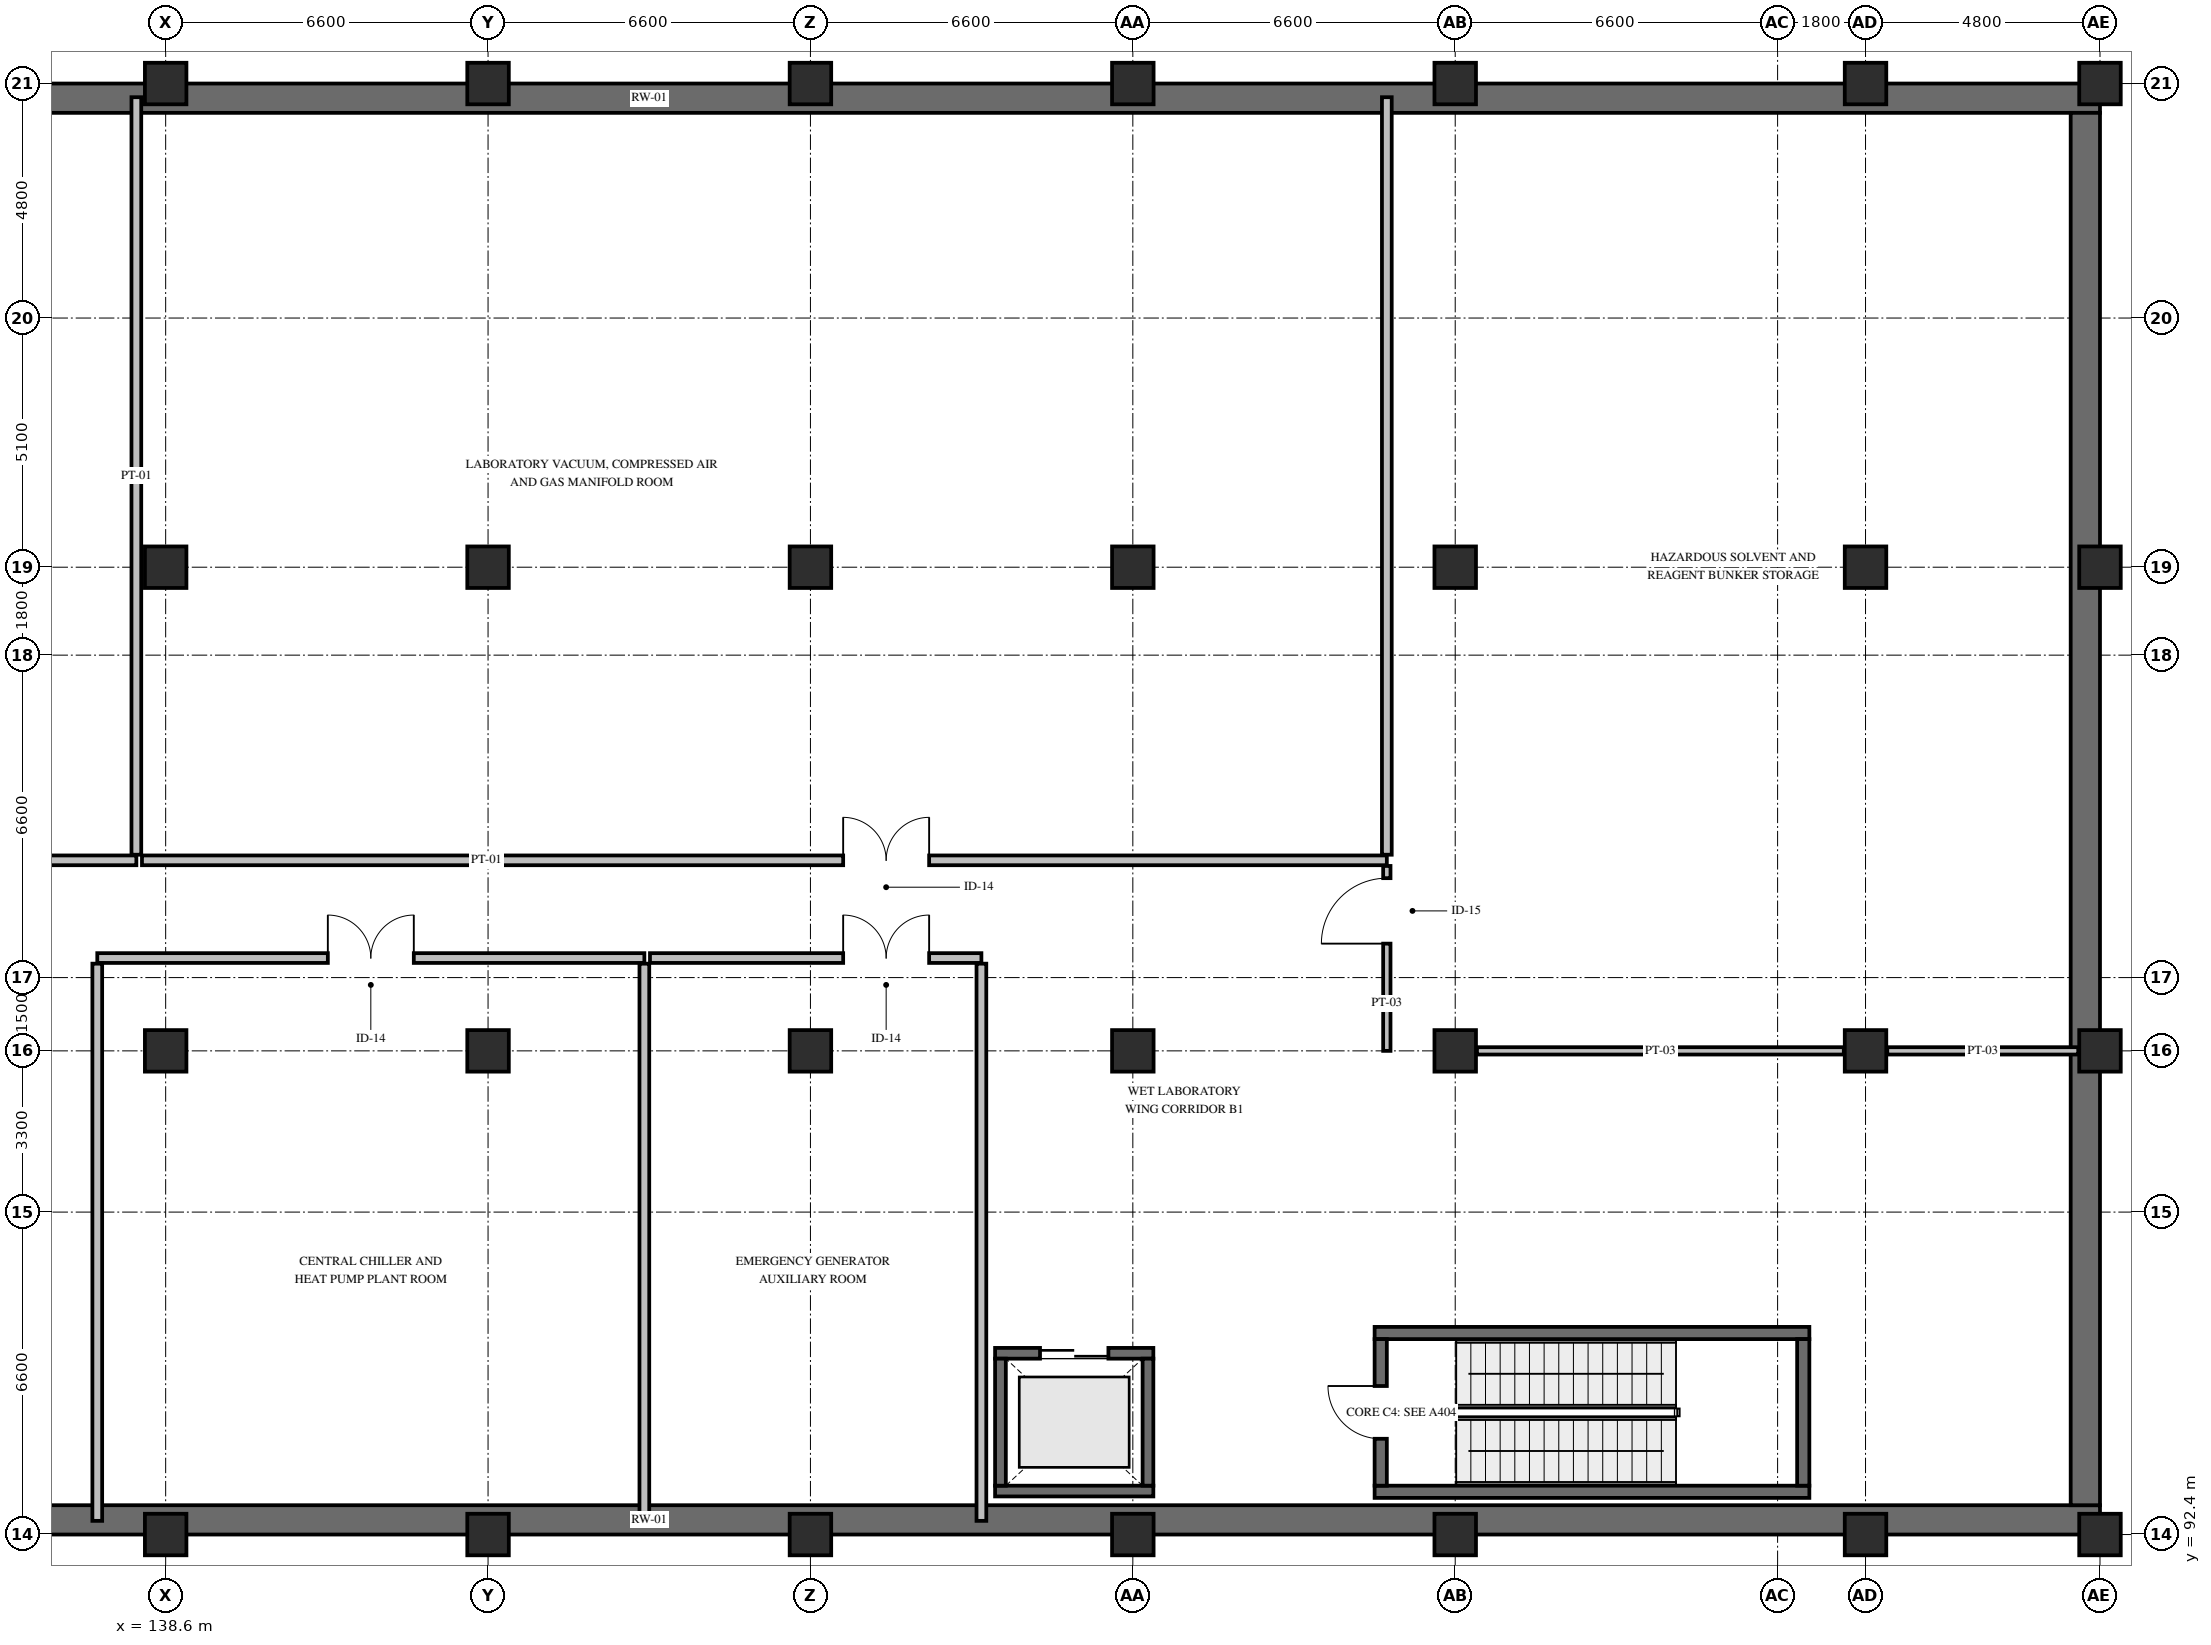
"""IFC4 building model, lengths in metres.
Left out: names, types, materials, properties, quantities, classifications, styles, units other than length and angle.
Written with IfcOpenShell. Run it as: python <this file> out.ifc"""

import sys

from ifc_helpers import new_model, si_unit, direction, frame, frame_2d, origin, origin_2d, place, context, subcontext, project, spatial, rectangle, extrude, element, fill, save


model = new_model("IFC4")
c1 = context("Model", 3, precision=1e-05, world=origin(), true_north=direction((0.0, 1.0)))
c2 = subcontext(c1, "Body", "Model", "MODEL_VIEW")
j1 = project(units=[si_unit("LENGTHUNIT", "METRE"), si_unit("PLANEANGLEUNIT", "RADIAN")], contexts=[c1])
p1 = place(None, origin())
s1 = spatial("IfcSite", under=j1, at=p1, CompositionType="ELEMENT")
p2 = place(p1, origin())
s2 = spatial("IfcBuilding", under=s1, at=p2, CompositionType="ELEMENT")
p3 = place(p2, frame((0.0, 0.0, -5.4)))
s3 = spatial("IfcBuildingStorey", under=s2, at=p3, CompositionType="ELEMENT", Elevation=-5.4)
for number, where, z_axis, x_axis in (
    (1, (118.8, 92.7, 0.0), (0.0, 0.0, 1.0), (1.0, 0.0, 0.0)),
    (2, (118.8, 121.8, 0.0), (0.0, 0.0, 1.0), (1.0, 0.0, 0.0)),
):
    element("IfcWall", number, at=place(p3, frame(where, z_axis=z_axis, x_axis=x_axis)), inside=s3, PredefinedType="USERDEFINED", context=c2, shape_type="SweptSolid", body=[
        extrude(rectangle(XDim=59.4, YDim=0.6, at=frame_2d((29.7, 0.0))), origin(), (0.0, 0.0, 1.0), 4.96),
    ])
p4 = place(p3, frame((177.9, 93.0, 0.0), z_axis=(0.0, 0.0, 1.0), x_axis=(0.0, 1.0, 0.0)))
e3 = element("IfcWall", 3, at=p4, inside=s3, PredefinedType="USERDEFINED", context=c2, shape_type="SweptSolid", body=[
    extrude(rectangle(XDim=28.5, YDim=0.6, at=frame_2d((14.25, 0.0))), origin(), (0.0, 0.0, 1.0), 4.96),
])
for number, where, z_axis, x_axis in (
    (4, (138.6, 92.4, 0.0), (0.0, 0.0, 1.0), (1.0, 0.0, 0.0)),
    (5, (138.6, 102.3, 0.0), (0.0, 0.0, 1.0), (1.0, 0.0, 0.0)),
    (6, (138.6, 112.2, 0.0), (0.0, 0.0, 1.0), (1.0, 0.0, 0.0)),
    (7, (138.6, 122.1, 0.0), (0.0, 0.0, 1.0), (1.0, 0.0, 0.0)),
    (8, (145.2, 92.4, 0.0), (0.0, 0.0, 1.0), (1.0, 0.0, 0.0)),
    (9, (145.2, 102.3, 0.0), (0.0, 0.0, 1.0), (1.0, 0.0, 0.0)),
    (10, (145.2, 112.2, 0.0), (0.0, 0.0, 1.0), (1.0, 0.0, 0.0)),
    (11, (145.2, 122.1, 0.0), (0.0, 0.0, 1.0), (1.0, 0.0, 0.0)),
    (12, (151.8, 92.4, 0.0), (0.0, 0.0, 1.0), (1.0, 0.0, 0.0)),
    (13, (151.8, 102.3, 0.0), (0.0, 0.0, 1.0), (1.0, 0.0, 0.0)),
    (14, (151.8, 112.2, 0.0), (0.0, 0.0, 1.0), (1.0, 0.0, 0.0)),
    (15, (151.8, 122.1, 0.0), (0.0, 0.0, 1.0), (1.0, 0.0, 0.0)),
    (16, (158.4, 92.4, 0.0), (0.0, 0.0, 1.0), (1.0, 0.0, 0.0)),
    (17, (158.4, 102.3, 0.0), (0.0, 0.0, 1.0), (1.0, 0.0, 0.0)),
    (18, (158.4, 112.2, 0.0), (0.0, 0.0, 1.0), (1.0, 0.0, 0.0)),
    (19, (158.4, 122.1, 0.0), (0.0, 0.0, 1.0), (1.0, 0.0, 0.0)),
    (20, (165.0, 92.4, 0.0), (0.0, 0.0, 1.0), (1.0, 0.0, 0.0)),
    (21, (165.0, 102.3, 0.0), (0.0, 0.0, 1.0), (1.0, 0.0, 0.0)),
    (22, (165.0, 112.2, 0.0), (0.0, 0.0, 1.0), (1.0, 0.0, 0.0)),
    (23, (165.0, 122.1, 0.0), (0.0, 0.0, 1.0), (1.0, 0.0, 0.0)),
    (24, (173.4, 92.4, 0.0), (0.0, 0.0, 1.0), (1.0, 0.0, 0.0)),
    (25, (173.4, 102.3, 0.0), (0.0, 0.0, 1.0), (1.0, 0.0, 0.0)),
    (26, (173.4, 112.2, 0.0), (0.0, 0.0, 1.0), (1.0, 0.0, 0.0)),
    (27, (173.4, 122.1, 0.0), (0.0, 0.0, 1.0), (1.0, 0.0, 0.0)),
    (28, (178.2, 92.4, 0.0), (0.0, 0.0, 1.0), (1.0, 0.0, 0.0)),
    (29, (178.2, 102.3, 0.0), (0.0, 0.0, 1.0), (1.0, 0.0, 0.0)),
    (30, (178.2, 112.2, 0.0), (0.0, 0.0, 1.0), (1.0, 0.0, 0.0)),
    (31, (178.2, 122.1, 0.0), (0.0, 0.0, 1.0), (1.0, 0.0, 0.0)),
):
    element("IfcColumn", number, at=place(p3, frame(where, z_axis=z_axis, x_axis=x_axis)), inside=s3, PredefinedType="COLUMN", context=c2, shape_type="SweptSolid", body=[
        extrude(rectangle(XDim=0.85, YDim=0.85, at=origin_2d()), origin(), (0.0, 0.0, 1.0), 5.4),
    ])
for number, where, z_axis, x_axis in (
    (32, (163.35, 93.275, 0.0), (0.0, 0.0, 1.0), (1.0, 0.0, 0.0)),
    (33, (163.35, 96.525, 0.0), (0.0, 0.0, 1.0), (1.0, 0.0, 0.0)),
):
    element("IfcWall", number, at=place(p3, frame(where, z_axis=z_axis, x_axis=x_axis)), inside=s3, PredefinedType="SHEAR", context=c2, shape_type="SweptSolid", body=[
        extrude(rectangle(XDim=8.9, YDim=0.25, at=frame_2d((4.45, 0.0))), origin(), (0.0, 0.0, 1.0), 4.96),
    ])
p5 = place(p3, frame((163.475, 93.4, 0.0), z_axis=(0.0, 0.0, 1.0), x_axis=(0.0, 1.0, 0.0)))
e34 = element("IfcWall", 34, at=p5, inside=s3, PredefinedType="SHEAR", context=c2, shape_type="SweptSolid", body=[
    extrude(rectangle(XDim=3.0, YDim=0.25, at=frame_2d((1.5, 0.0))), origin(), (0.0, 0.0, 1.0), 4.96),
])
p6 = place(p5, frame((0.96, 0.0, 0.0)))
e35 = element("IfcOpeningElement", 35, at=p6, cuts=e34, PredefinedType="OPENING", context=c2, shape_type="SweptSolid", body=[
    extrude(rectangle(XDim=1.08, YDim=2.2, at=frame_2d((0.54, 1.1))), frame((0.0, 0.14, 0.0), z_axis=(0.0, -1.0, 0.0), x_axis=(1.0, 0.0, 0.0)), (0.0, 0.0, 1.0), 0.28),
])
p7 = place(p3, frame((172.125, 93.4, 0.0), z_axis=(0.0, 0.0, 1.0), x_axis=(0.0, 1.0, 0.0)))
e36 = element("IfcWall", 36, at=p7, inside=s3, PredefinedType="SHEAR", context=c2, shape_type="SweptSolid", body=[
    extrude(rectangle(XDim=3.0, YDim=0.25, at=frame_2d((1.5, 0.0))), origin(), (0.0, 0.0, 1.0), 4.96),
])
p8 = place(p3, frame((155.58, 93.29, 0.0), z_axis=(0.0, 0.0, 1.0), x_axis=(1.0, 0.0, 0.0)))
e37 = element("IfcWall", 37, at=p8, inside=s3, PredefinedType="SHEAR", context=c2, shape_type="SweptSolid", body=[
    extrude(rectangle(XDim=3.24, YDim=0.22, at=frame_2d((1.62, 0.0))), origin(), (0.0, 0.0, 1.0), 4.96),
])
p9 = place(p3, frame((155.58, 96.11, 0.0), z_axis=(0.0, 0.0, 1.0), x_axis=(1.0, 0.0, 0.0)))
e38 = element("IfcWall", 38, at=p9, inside=s3, PredefinedType="SHEAR", context=c2, shape_type="SweptSolid", body=[
    extrude(rectangle(XDim=3.24, YDim=0.22, at=frame_2d((1.62, 0.0))), origin(), (0.0, 0.0, 1.0), 4.96),
])
p10 = place(p9, frame((0.92, 0.0, 0.0)))
e39 = element("IfcOpeningElement", 39, at=p10, cuts=e38, PredefinedType="OPENING", context=c2, shape_type="SweptSolid", body=[
    extrude(rectangle(XDim=1.4, YDim=2.3, at=frame_2d((0.7, 1.15))), frame((0.0, 0.125, 0.0), z_axis=(0.0, -1.0, 0.0), x_axis=(1.0, 0.0, 0.0)), (0.0, 0.0, 1.0), 0.25),
])
for number, where, z_axis, x_axis in (
    (40, (155.69, 93.4, 0.0), (0.0, 0.0, 1.0), (0.0, 1.0, 0.0)),
    (41, (158.71, 93.4, 0.0), (0.0, 0.0, 1.0), (0.0, 1.0, 0.0)),
):
    element("IfcWall", number, at=place(p3, frame(where, z_axis=z_axis, x_axis=x_axis)), inside=s3, PredefinedType="SHEAR", context=c2, shape_type="SweptSolid", body=[
        extrude(rectangle(XDim=2.6, YDim=0.22, at=frame_2d((1.3, 0.0))), origin(), (0.0, 0.0, 1.0), 4.96),
    ])
p11 = place(p3, frame((119.08, 106.2, 0.0), z_axis=(0.0, 0.0, 1.0), x_axis=(1.0, 0.0, 0.0)))
e42 = element("IfcWall", 42, at=p11, inside=s3, PredefinedType="PARTITIONING", context=c2, shape_type="SweptSolid", body=[
    extrude(rectangle(XDim=18.92, YDim=0.2, at=frame_2d((9.46, 0.0))), origin(), (0.0, 0.0, 1.0), 4.38),
])
p12 = place(p11, frame((8.58, 0.0, 0.0)))
e43 = element("IfcOpeningElement", 43, at=p12, cuts=e42, PredefinedType="OPENING", context=c2, shape_type="SweptSolid", body=[
    extrude(rectangle(XDim=1.76, YDim=2.35, at=frame_2d((0.88, 1.175))), frame((0.0, 0.115, 0.0), z_axis=(0.0, -1.0, 0.0), x_axis=(1.0, 0.0, 0.0)), (0.0, 0.0, 1.0), 0.23),
])
p13 = place(p3, frame((138.0, 106.315, 0.0), z_axis=(0.0, 0.0, 1.0), x_axis=(0.0, 1.0, 0.0)))
e44 = element("IfcWall", 44, at=p13, inside=s3, PredefinedType="PARTITIONING", context=c2, shape_type="SweptSolid", body=[
    extrude(rectangle(XDim=15.505, YDim=0.2, at=frame_2d((7.752, 0.0))), origin(), (0.0, 0.0, 1.0), 4.665),
])
p14 = place(p3, frame((138.115, 106.2, 0.0), z_axis=(0.0, 0.0, 1.0), x_axis=(1.0, 0.0, 0.0)))
e45 = element("IfcWall", 45, at=p14, inside=s3, PredefinedType="PARTITIONING", context=c2, shape_type="SweptSolid", body=[
    extrude(rectangle(XDim=25.485, YDim=0.2, at=frame_2d((12.743, 0.0))), origin(), (0.0, 0.0, 1.0), 4.38),
])
p15 = place(p14, frame((14.355, 0.0, 0.0)))
e46 = element("IfcOpeningElement", 46, at=p15, cuts=e45, PredefinedType="OPENING", context=c2, shape_type="SweptSolid", body=[
    extrude(rectangle(XDim=1.76, YDim=2.35, at=frame_2d((0.88, 1.175))), frame((0.0, 0.115, 0.0), z_axis=(0.0, -1.0, 0.0), x_axis=(1.0, 0.0, 0.0)), (0.0, 0.0, 1.0), 0.23),
])
p16 = place(p3, frame((163.6, 106.315, 0.0), z_axis=(0.0, 0.0, 1.0), x_axis=(0.0, 1.0, 0.0)))
e47 = element("IfcWall", 47, at=p16, inside=s3, PredefinedType="PARTITIONING", context=c2, shape_type="SweptSolid", body=[
    extrude(rectangle(XDim=15.505, YDim=0.2, at=frame_2d((7.752, 0.0))), origin(), (0.0, 0.0, 1.0), 4.665),
])
p17 = place(p3, frame((165.445, 102.3, 0.0), z_axis=(0.0, 0.0, 1.0), x_axis=(1.0, 0.0, 0.0)))
e48 = element("IfcWall", 48, at=p17, inside=s3, PredefinedType="PARTITIONING", context=c2, shape_type="SweptSolid", body=[
    extrude(rectangle(XDim=7.51, YDim=0.15, at=frame_2d((3.755, 0.0))), origin(), (0.0, 0.0, 1.0), 4.43),
])
p18 = place(p3, frame((173.845, 102.3, 0.0), z_axis=(0.0, 0.0, 1.0), x_axis=(1.0, 0.0, 0.0)))
e49 = element("IfcWall", 49, at=p18, inside=s3, PredefinedType="PARTITIONING", context=c2, shape_type="SweptSolid", body=[
    extrude(rectangle(XDim=3.91, YDim=0.15, at=frame_2d((1.955, 0.0))), origin(), (0.0, 0.0, 1.0), 4.665),
])
p19 = place(p3, frame((163.6, 102.3, 0.0), z_axis=(0.0, 0.0, 1.0), x_axis=(0.0, 1.0, 0.0)))
e50 = element("IfcWall", 50, at=p19, inside=s3, PredefinedType="PARTITIONING", context=c2, shape_type="SweptSolid", body=[
    extrude(rectangle(XDim=3.785, YDim=0.15, at=frame_2d((1.893, 0.0))), origin(), (0.0, 0.0, 1.0), 4.665),
])
p20 = place(p19, frame((2.195, 0.0, 0.0)))
e51 = element("IfcOpeningElement", 51, at=p20, cuts=e50, PredefinedType="OPENING", context=c2, shape_type="SweptSolid", body=[
    extrude(rectangle(XDim=1.34, YDim=2.2, at=frame_2d((0.67, 1.1))), frame((0.0, 0.09, 0.0), z_axis=(0.0, -1.0, 0.0), x_axis=(1.0, 0.0, 0.0)), (0.0, 0.0, 1.0), 0.18),
])
p21 = place(p3, frame((137.2, 104.2, 0.0), z_axis=(0.0, 0.0, 1.0), x_axis=(1.0, 0.0, 0.0)))
e52 = element("IfcWall", 52, at=p21, inside=s3, PredefinedType="PARTITIONING", context=c2, shape_type="SweptSolid", body=[
    extrude(rectangle(XDim=11.2, YDim=0.2, at=frame_2d((5.6, 0.0))), origin(), (0.0, 0.0, 1.0), 4.38),
])
p22 = place(p21, frame((4.72, 0.0, 0.0)))
e53 = element("IfcOpeningElement", 53, at=p22, cuts=e52, PredefinedType="OPENING", context=c2, shape_type="SweptSolid", body=[
    extrude(rectangle(XDim=1.76, YDim=2.35, at=frame_2d((0.88, 1.175))), frame((0.0, 0.115, 0.0), z_axis=(0.0, -1.0, 0.0), x_axis=(1.0, 0.0, 0.0)), (0.0, 0.0, 1.0), 0.23),
])
for number, where, z_axis, x_axis in (
    (54, (137.2, 92.68, 0.0), (0.0, 0.0, 1.0), (0.0, 1.0, 0.0)),
    (55, (148.4, 92.68, 0.0), (0.0, 0.0, 1.0), (0.0, 1.0, 0.0)),
):
    element("IfcWall", number, at=place(p3, frame(where, z_axis=z_axis, x_axis=x_axis)), inside=s3, PredefinedType="PARTITIONING", context=c2, shape_type="SweptSolid", body=[
        extrude(rectangle(XDim=11.405, YDim=0.2, at=frame_2d((5.703, 0.0))), origin(), (0.0, 0.0, 1.0), 4.665),
    ])
p23 = place(p3, frame((148.515, 104.2, 0.0), z_axis=(0.0, 0.0, 1.0), x_axis=(1.0, 0.0, 0.0)))
e56 = element("IfcWall", 56, at=p23, inside=s3, PredefinedType="PARTITIONING", context=c2, shape_type="SweptSolid", body=[
    extrude(rectangle(XDim=6.785, YDim=0.2, at=frame_2d((3.393, 0.0))), origin(), (0.0, 0.0, 1.0), 4.38),
])
p24 = place(p23, frame((3.955, 0.0, 0.0)))
e57 = element("IfcOpeningElement", 57, at=p24, cuts=e56, PredefinedType="OPENING", context=c2, shape_type="SweptSolid", body=[
    extrude(rectangle(XDim=1.76, YDim=2.35, at=frame_2d((0.88, 1.175))), frame((0.0, 0.115, 0.0), z_axis=(0.0, -1.0, 0.0), x_axis=(1.0, 0.0, 0.0)), (0.0, 0.0, 1.0), 0.23),
])
p25 = place(p3, frame((155.3, 92.68, 0.0), z_axis=(0.0, 0.0, 1.0), x_axis=(0.0, 1.0, 0.0)))
e58 = element("IfcWall", 58, at=p25, inside=s3, PredefinedType="PARTITIONING", context=c2, shape_type="SweptSolid", body=[
    extrude(rectangle(XDim=11.405, YDim=0.2, at=frame_2d((5.703, 0.0))), origin(), (0.0, 0.0, 1.0), 4.665),
])
p26 = place(p6, origin())
e59 = element("IfcDoor", 59, at=p26, inside=s3, OperationType="SINGLE_SWING_RIGHT", PredefinedType="DOOR", context=c2, shape_type="SweptSolid", body=[
    extrude(rectangle(XDim=1.08, YDim=2.2, at=frame_2d((0.54, 1.1))), frame((0.0, 0.025, 0.0), z_axis=(0.0, -1.0, 0.0), x_axis=(1.0, 0.0, 0.0)), (0.0, 0.0, 1.0), 0.05),
])
fill(e35, e59)
p27 = place(p10, origin())
e60 = element("IfcDoor", 60, at=p27, inside=s3, OperationType="DOUBLE_DOOR_SLIDING", PredefinedType="DOOR", context=c2, shape_type="SweptSolid", body=[
    extrude(rectangle(XDim=1.4, YDim=2.3, at=frame_2d((0.7, 1.15))), frame((0.0, 0.025, 0.0), z_axis=(0.0, -1.0, 0.0), x_axis=(1.0, 0.0, 0.0)), (0.0, 0.0, 1.0), 0.05),
])
fill(e39, e60)
p28 = place(p15, origin())
e61 = element("IfcDoor", 61, at=p28, inside=s3, OperationType="DOUBLE_DOOR_SINGLE_SWING", PredefinedType="DOOR", context=c2, shape_type="SweptSolid", body=[
    extrude(rectangle(XDim=1.76, YDim=2.35, at=frame_2d((0.88, 1.175))), frame((0.0, 0.025, 0.0), z_axis=(0.0, -1.0, 0.0), x_axis=(1.0, 0.0, 0.0)), (0.0, 0.0, 1.0), 0.05),
])
fill(e46, e61)
p29 = place(p20, origin())
e62 = element("IfcDoor", 62, at=p29, inside=s3, OperationType="SINGLE_SWING_LEFT", PredefinedType="DOOR", context=c2, shape_type="SweptSolid", body=[
    extrude(rectangle(XDim=1.34, YDim=2.2, at=frame_2d((0.67, 1.1))), frame((0.0, 0.025, 0.0), z_axis=(0.0, -1.0, 0.0), x_axis=(1.0, 0.0, 0.0)), (0.0, 0.0, 1.0), 0.05),
])
fill(e51, e62)
p30 = place(p22, origin())
e63 = element("IfcDoor", 63, at=p30, inside=s3, OperationType="DOUBLE_DOOR_SINGLE_SWING", PredefinedType="DOOR", context=c2, shape_type="SweptSolid", body=[
    extrude(rectangle(XDim=1.76, YDim=2.35, at=frame_2d((0.88, 1.175))), frame((0.0, 0.025, 0.0), z_axis=(0.0, -1.0, 0.0), x_axis=(1.0, 0.0, 0.0)), (0.0, 0.0, 1.0), 0.05),
])
fill(e53, e63)
p31 = place(p24, origin())
e64 = element("IfcDoor", 64, at=p31, inside=s3, OperationType="DOUBLE_DOOR_SINGLE_SWING", PredefinedType="DOOR", context=c2, shape_type="SweptSolid", body=[
    extrude(rectangle(XDim=1.76, YDim=2.35, at=frame_2d((0.88, 1.175))), frame((0.0, 0.025, 0.0), z_axis=(0.0, -1.0, 0.0), x_axis=(1.0, 0.0, 0.0)), (0.0, 0.0, 1.0), 0.05),
])
fill(e57, e64)
save(model, sys.argv[1])
